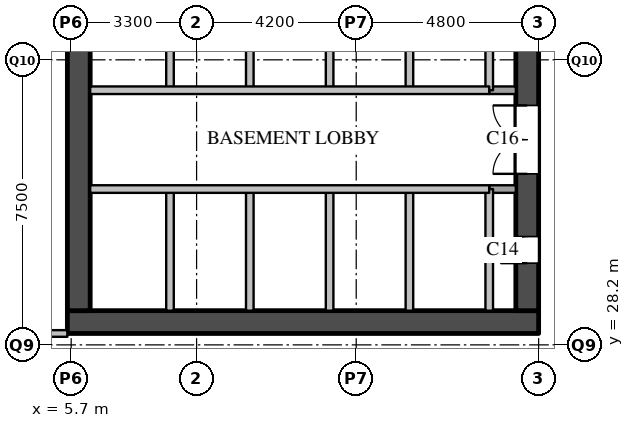
"""IFC4 building model, lengths in metres.
Left out: names, types, materials, properties, quantities, classifications, styles, units other than length and angle.
Written with IfcOpenShell. Run it as: python <this file> out.ifc"""

import sys

from ifc_helpers import new_model, si_unit, direction, frame, frame_2d, origin, place, context, subcontext, project, spatial, rectangle, extrude, element, fill, save


model = new_model("IFC4")
c1 = context("Model", 3, precision=1e-05, world=origin(), true_north=direction((0.0, 1.0)))
c2 = subcontext(c1, "Body", "Model", "MODEL_VIEW")
j1 = project(units=[si_unit("LENGTHUNIT", "METRE"), si_unit("PLANEANGLEUNIT", "RADIAN")], contexts=[c1])
p1 = place(None, origin())
s1 = spatial("IfcSite", under=j1, at=p1, CompositionType="ELEMENT")
p2 = place(p1, origin())
s2 = spatial("IfcBuilding", under=s1, at=p2, CompositionType="ELEMENT")
p3 = place(p2, frame((0.0, 0.0, -6.0)))
s3 = spatial("IfcBuildingStorey", under=s2, at=p3, CompositionType="ELEMENT", Elevation=-6.0)
p4 = place(p3, frame((5.6, 28.8, 0.0), z_axis=(0.0, 0.0, 1.0), x_axis=(1.0, 0.0, 0.0)))
e1 = element("IfcWall", 1, at=p4, inside=s3, PredefinedType="SHEAR", context=c2, shape_type="SweptSolid", body=[
    extrude(rectangle(XDim=12.4, YDim=0.6, at=frame_2d((6.2, 0.0))), origin(), (0.0, 0.0, 1.0), 5.59),
])
p5 = place(p3, frame((5.9, 29.1, 0.0), z_axis=(0.0, 0.0, 1.0), x_axis=(0.0, 1.0, 0.0)))
e2 = element("IfcWall", 2, at=p5, inside=s3, PredefinedType="SHEAR", context=c2, shape_type="SweptSolid", body=[
    extrude(rectangle(XDim=20.3, YDim=0.6, at=frame_2d((10.15, 0.0))), origin(), (0.0, 0.0, 1.0), 5.59),
])
p6 = place(p5, frame((16.4, 0.0, 0.0)))
e3 = element("IfcOpeningElement", 3, at=p6, cuts=e2, PredefinedType="OPENING", context=c2, shape_type="SweptSolid", body=[
    extrude(rectangle(XDim=1.0, YDim=2.1, at=frame_2d((0.5, 1.05))), frame((0.0, 0.31, 0.0), z_axis=(0.0, -1.0, 0.0), x_axis=(1.0, 0.0, 0.0)), (0.0, 0.0, 1.0), 0.62),
])
p7 = place(p3, frame((17.7, 29.1, 0.0), z_axis=(0.0, 0.0, 1.0), x_axis=(0.0, 1.0, 0.0)))
e4 = element("IfcWall", 4, at=p7, inside=s3, PredefinedType="SHEAR", context=c2, shape_type="SweptSolid", body=[
    extrude(rectangle(XDim=20.3, YDim=0.6, at=frame_2d((10.15, 0.0))), origin(), (0.0, 0.0, 1.0), 5.59),
])
p8 = place(p7, frame((1.25, 0.0, 0.0)))
e5 = element("IfcOpeningElement", 5, at=p8, cuts=e4, PredefinedType="OPENING", context=c2, shape_type="SweptSolid", body=[
    extrude(rectangle(XDim=0.7, YDim=2.1, at=frame_2d((0.35, 1.05))), frame((0.0, 0.31, 0.0), z_axis=(0.0, -1.0, 0.0), x_axis=(1.0, 0.0, 0.0)), (0.0, 0.0, 1.0), 0.62),
])
p9 = place(p7, frame((7.05, 0.0, 0.0)))
e6 = element("IfcOpeningElement", 6, at=p9, cuts=e4, PredefinedType="OPENING", context=c2, shape_type="SweptSolid", body=[
    extrude(rectangle(XDim=0.7, YDim=2.1, at=frame_2d((0.35, 1.05))), frame((0.0, 0.31, 0.0), z_axis=(0.0, -1.0, 0.0), x_axis=(1.0, 0.0, 0.0)), (0.0, 0.0, 1.0), 0.62),
])
p10 = place(p7, frame((3.6, 0.0, 0.0)))
e7 = element("IfcOpeningElement", 7, at=p10, cuts=e4, PredefinedType="OPENING", context=c2, shape_type="SweptSolid", body=[
    extrude(rectangle(XDim=1.8, YDim=2.1, at=frame_2d((0.9, 1.05))), frame((0.0, 0.31, 0.0), z_axis=(0.0, -1.0, 0.0), x_axis=(1.0, 0.0, 0.0)), (0.0, 0.0, 1.0), 0.62),
])
p11 = place(p7, frame((16.4, 0.0, 0.0)))
e8 = element("IfcOpeningElement", 8, at=p11, cuts=e4, PredefinedType="OPENING", context=c2, shape_type="SweptSolid", body=[
    extrude(rectangle(XDim=1.0, YDim=2.1, at=frame_2d((0.5, 1.05))), frame((0.0, 0.31, 0.0), z_axis=(0.0, -1.0, 0.0), x_axis=(1.0, 0.0, 0.0)), (0.0, 0.0, 1.0), 0.62),
])
p12 = place(p3, frame((8.3, 29.1, 0.0), z_axis=(0.0, 0.0, 1.0), x_axis=(0.0, 1.0, 0.0)))
e9 = element("IfcWall", 9, at=p12, inside=s3, PredefinedType="SOLIDWALL", context=c2, shape_type="SweptSolid", body=[
    extrude(rectangle(XDim=3.2, YDim=0.2, at=frame_2d((1.6, 0.0))), origin(), (0.0, 0.0, 1.0), 5.59),
])
p13 = place(p3, frame((8.3, 34.9, 0.0), z_axis=(0.0, 0.0, 1.0), x_axis=(0.0, 1.0, 0.0)))
e10 = element("IfcWall", 10, at=p13, inside=s3, PredefinedType="SOLIDWALL", context=c2, shape_type="SweptSolid", body=[
    extrude(rectangle(XDim=3.2, YDim=0.2, at=frame_2d((1.6, 0.0))), origin(), (0.0, 0.0, 1.0), 5.59),
])
p14 = place(p3, frame((10.4, 29.1, 0.0), z_axis=(0.0, 0.0, 1.0), x_axis=(0.0, 1.0, 0.0)))
e11 = element("IfcWall", 11, at=p14, inside=s3, PredefinedType="SOLIDWALL", context=c2, shape_type="SweptSolid", body=[
    extrude(rectangle(XDim=3.2, YDim=0.2, at=frame_2d((1.6, 0.0))), origin(), (0.0, 0.0, 1.0), 5.59),
])
p15 = place(p3, frame((10.4, 34.9, 0.0), z_axis=(0.0, 0.0, 1.0), x_axis=(0.0, 1.0, 0.0)))
e12 = element("IfcWall", 12, at=p15, inside=s3, PredefinedType="SOLIDWALL", context=c2, shape_type="SweptSolid", body=[
    extrude(rectangle(XDim=3.2, YDim=0.2, at=frame_2d((1.6, 0.0))), origin(), (0.0, 0.0, 1.0), 5.59),
])
p16 = place(p3, frame((12.5, 29.1, 0.0), z_axis=(0.0, 0.0, 1.0), x_axis=(0.0, 1.0, 0.0)))
e13 = element("IfcWall", 13, at=p16, inside=s3, PredefinedType="SOLIDWALL", context=c2, shape_type="SweptSolid", body=[
    extrude(rectangle(XDim=3.2, YDim=0.2, at=frame_2d((1.6, 0.0))), origin(), (0.0, 0.0, 1.0), 5.59),
])
p17 = place(p3, frame((12.5, 34.9, 0.0), z_axis=(0.0, 0.0, 1.0), x_axis=(0.0, 1.0, 0.0)))
e14 = element("IfcWall", 14, at=p17, inside=s3, PredefinedType="SOLIDWALL", context=c2, shape_type="SweptSolid", body=[
    extrude(rectangle(XDim=3.2, YDim=0.2, at=frame_2d((1.6, 0.0))), origin(), (0.0, 0.0, 1.0), 5.59),
])
p18 = place(p3, frame((14.6, 29.1, 0.0), z_axis=(0.0, 0.0, 1.0), x_axis=(0.0, 1.0, 0.0)))
e15 = element("IfcWall", 15, at=p18, inside=s3, PredefinedType="SOLIDWALL", context=c2, shape_type="SweptSolid", body=[
    extrude(rectangle(XDim=3.2, YDim=0.2, at=frame_2d((1.6, 0.0))), origin(), (0.0, 0.0, 1.0), 5.59),
])
p19 = place(p3, frame((14.6, 34.9, 0.0), z_axis=(0.0, 0.0, 1.0), x_axis=(0.0, 1.0, 0.0)))
e16 = element("IfcWall", 16, at=p19, inside=s3, PredefinedType="SOLIDWALL", context=c2, shape_type="SweptSolid", body=[
    extrude(rectangle(XDim=3.2, YDim=0.2, at=frame_2d((1.6, 0.0))), origin(), (0.0, 0.0, 1.0), 5.59),
])
p20 = place(p3, frame((16.7, 29.1, 0.0), z_axis=(0.0, 0.0, 1.0), x_axis=(0.0, 1.0, 0.0)))
e17 = element("IfcWall", 17, at=p20, inside=s3, PredefinedType="SOLIDWALL", context=c2, shape_type="SweptSolid", body=[
    extrude(rectangle(XDim=3.2, YDim=0.2, at=frame_2d((1.6, 0.0))), origin(), (0.0, 0.0, 1.0), 5.59),
])
p21 = place(p3, frame((16.7, 34.9, 0.0), z_axis=(0.0, 0.0, 1.0), x_axis=(0.0, 1.0, 0.0)))
e18 = element("IfcWall", 18, at=p21, inside=s3, PredefinedType="SOLIDWALL", context=c2, shape_type="SweptSolid", body=[
    extrude(rectangle(XDim=3.2, YDim=0.2, at=frame_2d((1.6, 0.0))), origin(), (0.0, 0.0, 1.0), 5.59),
])
p22 = place(p3, frame((6.2, 32.3, 0.0), z_axis=(0.0, 0.0, 1.0), x_axis=(1.0, 0.0, 0.0)))
e19 = element("IfcWall", 19, at=p22, inside=s3, PredefinedType="SOLIDWALL", context=c2, shape_type="SweptSolid", body=[
    extrude(rectangle(XDim=10.5, YDim=0.2, at=frame_2d((5.25, 0.0))), origin(), (0.0, 0.0, 1.0), 5.59),
])
p23 = place(p3, frame((16.7, 32.3, 0.0), z_axis=(0.0, 0.0, 1.0), x_axis=(1.0, 0.0, 0.0)))
e20 = element("IfcWall", 20, at=p23, inside=s3, PredefinedType="SOLIDWALL", context=c2, shape_type="SweptSolid", body=[
    extrude(rectangle(XDim=0.7, YDim=0.2, at=frame_2d((0.35, 0.0))), origin(), (0.0, 0.0, 1.0), 5.59),
])
p24 = place(p3, frame((6.2, 34.9, 0.0), z_axis=(0.0, 0.0, 1.0), x_axis=(1.0, 0.0, 0.0)))
e21 = element("IfcWall", 21, at=p24, inside=s3, PredefinedType="SOLIDWALL", context=c2, shape_type="SweptSolid", body=[
    extrude(rectangle(XDim=10.5, YDim=0.2, at=frame_2d((5.25, 0.0))), origin(), (0.0, 0.0, 1.0), 5.59),
])
p25 = place(p3, frame((16.7, 34.9, 0.0), z_axis=(0.0, 0.0, 1.0), x_axis=(1.0, 0.0, 0.0)))
e22 = element("IfcWall", 22, at=p25, inside=s3, PredefinedType="SOLIDWALL", context=c2, shape_type="SweptSolid", body=[
    extrude(rectangle(XDim=0.7, YDim=0.2, at=frame_2d((0.35, 0.0))), origin(), (0.0, 0.0, 1.0), 5.59),
])
p26 = place(p3, frame((0.0, 28.5, 0.0), z_axis=(0.0, 0.0, 1.0), x_axis=(1.0, 0.0, 0.0)))
e23 = element("IfcWall", 23, at=p26, inside=s3, PredefinedType="PARTITIONING", context=c2, shape_type="SweptSolid", body=[
    extrude(rectangle(XDim=5.6, YDim=0.175, at=frame_2d((2.8, 0.0))), origin(), (0.0, 0.0, 1.0), 5.59),
])
p27 = place(p26, frame((2.3, 0.0, 0.0)))
e24 = element("IfcOpeningElement", 24, at=p27, cuts=e23, PredefinedType="OPENING", context=c2, shape_type="SweptSolid", body=[
    extrude(rectangle(XDim=1.0, YDim=2.1, at=frame_2d((0.5, 1.05))), frame((0.0, 0.097, 0.0), z_axis=(0.0, -1.0, 0.0), x_axis=(1.0, 0.0, 0.0)), (0.0, 0.0, 1.0), 0.195),
])
p28 = place(p8, origin())
e25 = element("IfcDoor", 25, at=p28, inside=s3, OperationType="SINGLE_SWING_LEFT", PredefinedType="DOOR", context=c2, shape_type="SweptSolid", body=[
    extrude(rectangle(XDim=0.7, YDim=2.1, at=frame_2d((0.35, 1.05))), frame((0.0, 0.025, 0.0), z_axis=(0.0, -1.0, 0.0), x_axis=(1.0, 0.0, 0.0)), (0.0, 0.0, 1.0), 0.05),
])
fill(e5, e25)
p29 = place(p10, origin())
e26 = element("IfcDoor", 26, at=p29, inside=s3, OperationType="DOUBLE_DOOR_SINGLE_SWING", PredefinedType="DOOR", context=c2, shape_type="SweptSolid", body=[
    extrude(rectangle(XDim=1.8, YDim=2.1, at=frame_2d((0.9, 1.05))), frame((0.0, 0.025, 0.0), z_axis=(0.0, -1.0, 0.0), x_axis=(1.0, 0.0, 0.0)), (0.0, 0.0, 1.0), 0.05),
])
fill(e7, e26)
save(model, sys.argv[1])
